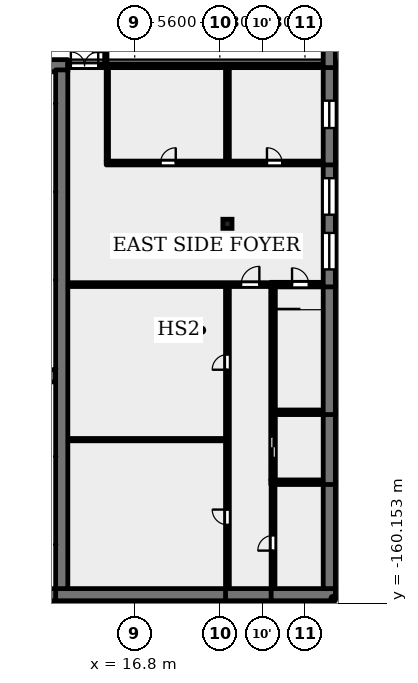
"""IFC4 building model, lengths in metres.
Left out: names, types, materials, properties, quantities, classifications, styles, units other than length and angle.
Written with IfcOpenShell. Run it as: python <this file> out.ifc"""

import sys

from ifc_helpers import new_model, si_unit, direction, frame, frame_2d, origin, origin_2d, place, context, subcontext, project, spatial, rectangle, extrude, element, fill, save


model = new_model("IFC4")
c1 = context("Model", 3, precision=1e-05, world=origin(), true_north=direction((0.0, 1.0)))
c2 = subcontext(c1, "Body", "Model", "MODEL_VIEW")
j1 = project(units=[si_unit("LENGTHUNIT", "METRE"), si_unit("PLANEANGLEUNIT", "RADIAN")], contexts=[c1])
p1 = place(None, origin())
s1 = spatial("IfcSite", under=j1, at=p1, CompositionType="ELEMENT")
p2 = place(p1, origin())
s2 = spatial("IfcBuilding", under=s1, at=p2, CompositionType="ELEMENT")
p3 = place(p2, frame((0.0, 0.0, 20.9)))
s3 = spatial("IfcBuildingStorey", under=s2, at=p3, CompositionType="ELEMENT", Elevation=20.9)
p4 = place(p3, frame((22.9, -135.2, 0.0), z_axis=(0.0, 0.0, 1.0), x_axis=(1.0, 0.0, 0.0)))
e1 = element("IfcColumn", 1, at=p4, inside=s3, PredefinedType="COLUMN", context=c2, shape_type="SweptSolid", body=[
    extrude(rectangle(XDim=0.6, YDim=0.6, at=origin_2d()), origin(), (0.0, 0.0, 1.0), 4.5),
])
p5 = place(p3, frame((-12.4, -159.6, 0.0), z_axis=(0.0, 0.0, 1.0), x_axis=(1.0, 0.0, 0.0)))
e2 = element("IfcWall", 2, at=p5, inside=s3, PredefinedType="SOLIDWALL", context=c2, shape_type="SweptSolid", body=[
    extrude(rectangle(XDim=24.8, YDim=0.8, at=frame_2d((12.4, 0.0))), origin(), (0.0, 0.0, 1.0), 5.55),
])
p6 = place(p3, frame((11.6, -159.6, 0.0), z_axis=(0.0, 0.0, 1.0), x_axis=(1.0, 0.0, 0.0)))
e3 = element("IfcWall", 3, at=p6, inside=s3, PredefinedType="SOLIDWALL", context=c2, shape_type="SweptSolid", body=[
    extrude(rectangle(XDim=11.425, YDim=0.8, at=frame_2d((5.712, 0.0))), origin(), (0.0, 0.0, 1.0), 4.5),
])
p7 = place(p3, frame((22.775, -159.6, 0.0), z_axis=(0.0, 0.0, 1.0), x_axis=(1.0, 0.0, 0.0)))
e4 = element("IfcWall", 4, at=p7, inside=s3, PredefinedType="SOLIDWALL", context=c2, shape_type="SweptSolid", body=[
    extrude(rectangle(XDim=3.25, YDim=0.8, at=frame_2d((1.625, 0.0))), origin(), (0.0, 0.0, 1.0), 4.5),
])
p8 = place(p3, frame((25.775, -159.6, 0.0), z_axis=(0.0, 0.0, 1.0), x_axis=(1.0, 0.0, 0.0)))
e5 = element("IfcWall", 5, at=p8, inside=s3, PredefinedType="SOLIDWALL", context=c2, shape_type="SweptSolid", body=[
    extrude(rectangle(XDim=4.225, YDim=0.8, at=frame_2d((2.112, 0.0))), origin(), (0.0, 0.0, 1.0), 4.5),
])
p9 = place(p3, frame((25.75, -152.2, 0.0), z_axis=(0.0, 0.0, 1.0), x_axis=(1.0, 0.0, 0.0)))
e6 = element("IfcWall", 6, at=p9, inside=s3, PredefinedType="SOLIDWALL", context=c2, shape_type="SweptSolid", body=[
    extrude(rectangle(XDim=3.45, YDim=0.3, at=frame_2d((1.725, 0.0))), origin(), (0.0, 0.0, 1.0), 4.5),
])
p10 = place(p3, frame((12.4, -149.4, 0.0), z_axis=(0.0, 0.0, 1.0), x_axis=(1.0, 0.0, 0.0)))
e7 = element("IfcWall", 7, at=p10, inside=s3, PredefinedType="PARTITIONING", context=c2, shape_type="SweptSolid", body=[
    extrude(rectangle(XDim=10.375, YDim=0.15, at=frame_2d((5.188, 0.0))), origin(), (0.0, 0.0, 1.0), 4.5),
])
p11 = place(p3, frame((26.05, -147.6, 0.0), z_axis=(0.0, 0.0, 1.0), x_axis=(1.0, 0.0, 0.0)))
e8 = element("IfcWall", 8, at=p11, inside=s3, PredefinedType="SOLIDWALL", context=c2, shape_type="SweptSolid", body=[
    extrude(rectangle(XDim=3.15, YDim=0.3, at=frame_2d((1.575, 0.0))), origin(), (0.0, 0.0, 1.0), 4.5),
])
p12 = place(p3, frame((-11.6, -145.2, 0.0), z_axis=(0.0, 0.0, 1.0), x_axis=(1.0, 0.0, 0.0)))
e9 = element("IfcWall", 9, at=p12, inside=s3, PredefinedType="SOLIDWALL", context=c2, shape_type="SweptSolid", body=[
    extrude(rectangle(XDim=23.2, YDim=0.8, at=frame_2d((11.6, 0.0))), origin(), (0.0, 0.0, 1.0), 5.55),
])
p13 = place(p3, frame((12.4, -139.2, 0.0), z_axis=(0.0, 0.0, 1.0), x_axis=(1.0, 0.0, 0.0)))
e10 = element("IfcWall", 10, at=p13, inside=s3, PredefinedType="SOLIDWALL", context=c2, shape_type="SweptSolid", body=[
    extrude(rectangle(XDim=13.35, YDim=0.25, at=frame_2d((6.675, 0.0))), origin(), (0.0, 0.0, 1.0), 4.5),
])
p14 = place(p13, frame((11.4, 0.0, 0.0)))
e11 = element("IfcOpeningElement", 11, at=p14, cuts=e10, PredefinedType="OPENING", context=c2, shape_type="SweptSolid", body=[
    extrude(rectangle(XDim=1.2, YDim=2.1, at=frame_2d((0.6, 1.05))), frame((0.0, 0.135, 0.0), z_axis=(0.0, -1.0, 0.0), x_axis=(1.0, 0.0, 0.0)), (0.0, 0.0, 1.0), 0.27),
])
p15 = place(p3, frame((25.75, -139.2, 0.0), z_axis=(0.0, 0.0, 1.0), x_axis=(1.0, 0.0, 0.0)))
e12 = element("IfcWall", 12, at=p15, inside=s3, PredefinedType="SOLIDWALL", context=c2, shape_type="SweptSolid", body=[
    extrude(rectangle(XDim=3.45, YDim=0.3, at=frame_2d((1.725, 0.0))), origin(), (0.0, 0.0, 1.0), 4.5),
])
p16 = place(p15, frame((1.4, 0.0, 0.0)))
e13 = element("IfcOpeningElement", 13, at=p16, cuts=e12, PredefinedType="OPENING", context=c2, shape_type="SweptSolid", body=[
    extrude(rectangle(XDim=1.1, YDim=2.1, at=frame_2d((0.55, 1.05))), frame((0.0, 0.16, 0.0), z_axis=(0.0, -1.0, 0.0), x_axis=(1.0, 0.0, 0.0)), (0.0, 0.0, 1.0), 0.32),
])
p17 = place(p3, frame((14.925, -131.2, 0.0), z_axis=(0.0, 0.0, 1.0), x_axis=(1.0, 0.0, 0.0)))
e14 = element("IfcWall", 14, at=p17, inside=s3, PredefinedType="SOLIDWALL", context=c2, shape_type="SweptSolid", body=[
    extrude(rectangle(XDim=14.275, YDim=0.25, at=frame_2d((7.137, 0.0))), origin(), (0.0, 0.0, 1.0), 4.5),
])
p18 = place(p17, frame((3.575, 0.0, 0.0)))
e15 = element("IfcOpeningElement", 15, at=p18, cuts=e14, PredefinedType="OPENING", context=c2, shape_type="SweptSolid", body=[
    extrude(rectangle(XDim=1.0, YDim=2.1, at=frame_2d((0.5, 1.05))), frame((0.0, 0.135, 0.0), z_axis=(0.0, -1.0, 0.0), x_axis=(1.0, 0.0, 0.0)), (0.0, 0.0, 1.0), 0.27),
])
p19 = place(p17, frame((10.575, 0.0, 0.0)))
e16 = element("IfcOpeningElement", 16, at=p19, cuts=e14, PredefinedType="OPENING", context=c2, shape_type="SweptSolid", body=[
    extrude(rectangle(XDim=1.0, YDim=2.1, at=frame_2d((0.5, 1.05))), frame((0.0, 0.135, 0.0), z_axis=(0.0, -1.0, 0.0), x_axis=(1.0, 0.0, 0.0)), (0.0, 0.0, 1.0), 0.27),
])
p20 = place(p3, frame((-12.4, -124.8, 0.0), z_axis=(0.0, 0.0, 1.0), x_axis=(1.0, 0.0, 0.0)))
e17 = element("IfcWall", 17, at=p20, inside=s3, PredefinedType="SOLIDWALL", context=c2, shape_type="SweptSolid", body=[
    extrude(rectangle(XDim=24.8, YDim=0.8, at=frame_2d((12.4, 0.0))), origin(), (0.0, 0.0, 1.0), 5.55),
])
p21 = place(p3, frame((12.4, -124.8, 0.0), z_axis=(0.0, 0.0, 1.0), x_axis=(1.0, 0.0, 0.0)))
e18 = element("IfcWall", 18, at=p21, inside=s3, PredefinedType="SOLIDWALL", context=c2, shape_type="SweptSolid", body=[
    extrude(rectangle(XDim=16.8, YDim=0.25, at=frame_2d((8.4, 0.0))), origin(), (0.0, 0.0, 1.0), 4.5),
])
p22 = place(p21, frame((0.2, 0.0, 0.0)))
e19 = element("IfcOpeningElement", 19, at=p22, cuts=e18, PredefinedType="OPENING", context=c2, shape_type="SweptSolid", body=[
    extrude(rectangle(XDim=1.8, YDim=2.1, at=frame_2d((0.9, 1.05))), frame((0.0, 0.135, 0.0), z_axis=(0.0, -1.0, 0.0), x_axis=(1.0, 0.0, 0.0)), (0.0, 0.0, 1.0), 0.27),
])
p23 = place(p3, frame((12.0, -159.2, 0.0), z_axis=(0.0, 0.0, 1.0), x_axis=(0.0, 1.0, 0.0)))
e20 = element("IfcWall", 20, at=p23, inside=s3, PredefinedType="SOLIDWALL", context=c2, shape_type="SweptSolid", body=[
    extrude(rectangle(XDim=34.125, YDim=0.8, at=frame_2d((17.062, 0.0))), origin(), (0.0, 0.0, 1.0), 5.55),
])
p24 = place(p3, frame((14.9, -124.675, 0.0), z_axis=(0.0, 0.0, 1.0), x_axis=(0.0, 1.0, 0.0)))
e21 = element("IfcWall", 21, at=p24, inside=s3, PredefinedType="PARTITIONING", context=c2, shape_type="SweptSolid", body=[
    extrude(rectangle(XDim=3.325, YDim=0.15, at=frame_2d((1.663, 0.0))), origin(), (0.0, 0.0, 1.0), 4.5),
])
p25 = place(p24, frame((0.775, 0.0, 0.0)))
e22 = element("IfcOpeningElement", 22, at=p25, cuts=e21, PredefinedType="OPENING", context=c2, shape_type="SweptSolid", body=[
    extrude(rectangle(XDim=1.8, YDim=2.1, at=frame_2d((0.9, 1.05))), frame((0.0, 0.085, 0.0), z_axis=(0.0, -1.0, 0.0), x_axis=(1.0, 0.0, 0.0)), (0.0, 0.0, 1.0), 0.17),
])
p26 = place(p3, frame((15.0, -131.075, 0.0), z_axis=(0.0, 0.0, 1.0), x_axis=(0.0, 1.0, 0.0)))
e23 = element("IfcWall", 23, at=p26, inside=s3, PredefinedType="PARTITIONING", context=c2, shape_type="SweptSolid", body=[
    extrude(rectangle(XDim=6.15, YDim=0.15, at=frame_2d((3.075, 0.0))), origin(), (0.0, 0.0, 1.0), 4.5),
])
p27 = place(p3, frame((22.9, -159.2, 0.0), z_axis=(0.0, 0.0, 1.0), x_axis=(0.0, 1.0, 0.0)))
e24 = element("IfcWall", 24, at=p27, inside=s3, PredefinedType="SOLIDWALL", context=c2, shape_type="SweptSolid", body=[
    extrude(rectangle(XDim=19.875, YDim=0.25, at=frame_2d((9.938, 0.0))), origin(), (0.0, 0.0, 1.0), 4.5),
])
p28 = place(p27, frame((14.4, 0.0, 0.0)))
e25 = element("IfcOpeningElement", 25, at=p28, cuts=e24, PredefinedType="OPENING", context=c2, shape_type="SweptSolid", body=[
    extrude(rectangle(XDim=1.0, YDim=2.1, at=frame_2d((0.5, 1.05))), frame((0.0, 0.135, 0.0), z_axis=(0.0, -1.0, 0.0), x_axis=(1.0, 0.0, 0.0)), (0.0, 0.0, 1.0), 0.27),
])
p29 = place(p27, frame((4.2, 0.0, 0.0)))
e26 = element("IfcOpeningElement", 26, at=p29, cuts=e24, PredefinedType="OPENING", context=c2, shape_type="SweptSolid", body=[
    extrude(rectangle(XDim=1.0, YDim=2.1, at=frame_2d((0.5, 1.05))), frame((0.0, 0.135, 0.0), z_axis=(0.0, -1.0, 0.0), x_axis=(1.0, 0.0, 0.0)), (0.0, 0.0, 1.0), 0.27),
])
p30 = place(p3, frame((22.9, -131.075, 0.0), z_axis=(0.0, 0.0, 1.0), x_axis=(0.0, 1.0, 0.0)))
e27 = element("IfcWall", 27, at=p30, inside=s3, PredefinedType="SOLIDWALL", context=c2, shape_type="SweptSolid", body=[
    extrude(rectangle(XDim=6.15, YDim=0.25, at=frame_2d((3.075, 0.0))), origin(), (0.0, 0.0, 1.0), 4.5),
])
p31 = place(p3, frame((25.9, -159.2, 0.0), z_axis=(0.0, 0.0, 1.0), x_axis=(0.0, 1.0, 0.0)))
e28 = element("IfcWall", 28, at=p31, inside=s3, PredefinedType="SOLIDWALL", context=c2, shape_type="SweptSolid", body=[
    extrude(rectangle(XDim=6.85, YDim=0.25, at=frame_2d((3.425, 0.0))), origin(), (0.0, 0.0, 1.0), 4.5),
])
p32 = place(p31, frame((2.5, 0.0, 0.0)))
e29 = element("IfcOpeningElement", 29, at=p32, cuts=e28, PredefinedType="OPENING", context=c2, shape_type="SweptSolid", body=[
    extrude(rectangle(XDim=1.0, YDim=2.1, at=frame_2d((0.5, 1.05))), frame((0.0, 0.135, 0.0), z_axis=(0.0, -1.0, 0.0), x_axis=(1.0, 0.0, 0.0)), (0.0, 0.0, 1.0), 0.27),
])
p33 = place(p3, frame((25.9, -152.05, 0.0), z_axis=(0.0, 0.0, 1.0), x_axis=(0.0, 1.0, 0.0)))
e30 = element("IfcWall", 30, at=p33, inside=s3, PredefinedType="SOLIDWALL", context=c2, shape_type="SweptSolid", body=[
    extrude(rectangle(XDim=12.825, YDim=0.3, at=frame_2d((6.413, 0.0))), origin(), (0.0, 0.0, 1.0), 4.5),
])
p34 = place(p33, frame((1.45, 0.0, 0.0)))
e31 = element("IfcOpeningElement", 31, at=p34, cuts=e30, PredefinedType="OPENING", context=c2, shape_type="SweptSolid", body=[
    extrude(rectangle(XDim=1.4, YDim=2.2, at=frame_2d((0.7, 1.1))), frame((0.0, 0.16, 0.0), z_axis=(0.0, -1.0, 0.0), x_axis=(1.0, 0.0, 0.0)), (0.0, 0.0, 1.0), 0.32),
])
p35 = place(p3, frame((29.6, -152.05, 0.0), z_axis=(0.0, 0.0, 1.0), x_axis=(0.0, -1.0, 0.0)))
e32 = element("IfcWall", 32, at=p35, inside=s3, PredefinedType="SOLIDWALL", context=c2, shape_type="SweptSolid", body=[
    extrude(rectangle(XDim=7.15, YDim=0.8, at=frame_2d((3.575, 0.0))), origin(), (0.0, 0.0, 1.0), 4.5),
])
p36 = place(p3, frame((29.6, -147.45, 0.0), z_axis=(0.0, 0.0, 1.0), x_axis=(0.0, -1.0, 0.0)))
e33 = element("IfcWall", 33, at=p36, inside=s3, PredefinedType="SOLIDWALL", context=c2, shape_type="SweptSolid", body=[
    extrude(rectangle(XDim=4.9, YDim=0.8, at=frame_2d((2.45, 0.0))), origin(), (0.0, 0.0, 1.0), 4.5),
])
p37 = place(p3, frame((29.6, -139.05, 0.0), z_axis=(0.0, 0.0, 1.0), x_axis=(0.0, -1.0, 0.0)))
e34 = element("IfcWall", 34, at=p37, inside=s3, PredefinedType="SOLIDWALL", context=c2, shape_type="SweptSolid", body=[
    extrude(rectangle(XDim=8.7, YDim=0.8, at=frame_2d((4.35, 0.0))), origin(), (0.0, 0.0, 1.0), 4.5),
])
p38 = place(p3, frame((29.6, -131.075, 0.0), z_axis=(0.0, 0.0, 1.0), x_axis=(0.0, -1.0, 0.0)))
e35 = element("IfcWall", 35, at=p38, inside=s3, PredefinedType="SOLIDWALL", context=c2, shape_type="SweptSolid", body=[
    extrude(rectangle(XDim=8.275, YDim=0.8, at=frame_2d((4.137, 0.0))), origin(), (0.0, 0.0, 1.0), 4.5),
])
p39 = place(p38, frame((4.725, 0.0, 0.6)))
e36 = element("IfcOpeningElement", 36, at=p39, cuts=e35, PredefinedType="OPENING", context=c2, shape_type="SweptSolid", body=[
    extrude(rectangle(XDim=2.4, YDim=3.2, at=frame_2d((1.2, 1.6))), frame((0.0, 0.41, 0.0), z_axis=(0.0, -1.0, 0.0), x_axis=(1.0, 0.0, 0.0)), (0.0, 0.0, 1.0), 0.82),
])
p40 = place(p38, frame((1.125, 0.0, 0.6)))
e37 = element("IfcOpeningElement", 37, at=p40, cuts=e35, PredefinedType="OPENING", context=c2, shape_type="SweptSolid", body=[
    extrude(rectangle(XDim=2.4, YDim=3.2, at=frame_2d((1.2, 1.6))), frame((0.0, 0.41, 0.0), z_axis=(0.0, -1.0, 0.0), x_axis=(1.0, 0.0, 0.0)), (0.0, 0.0, 1.0), 0.82),
])
p41 = place(p3, frame((29.6, -124.675, 0.0), z_axis=(0.0, 0.0, 1.0), x_axis=(0.0, -1.0, 0.0)))
e38 = element("IfcWall", 38, at=p41, inside=s3, PredefinedType="SOLIDWALL", context=c2, shape_type="SweptSolid", body=[
    extrude(rectangle(XDim=6.65, YDim=0.8, at=frame_2d((3.325, 0.0))), origin(), (0.0, 0.0, 1.0), 4.5),
])
p42 = place(p41, frame((2.425, 0.0, 0.9)))
e39 = element("IfcOpeningElement", 39, at=p42, cuts=e38, PredefinedType="OPENING", context=c2, shape_type="SweptSolid", body=[
    extrude(rectangle(XDim=1.8, YDim=1.5, at=frame_2d((0.9, 0.75))), frame((0.0, 0.41, 0.0), z_axis=(0.0, -1.0, 0.0), x_axis=(1.0, 0.0, 0.0)), (0.0, 0.0, 1.0), 0.82),
])
p43 = place(p3, frame((29.6, -121.05, 0.0), z_axis=(0.0, 0.0, 1.0), x_axis=(0.0, -1.0, 0.0)))
e40 = element("IfcWall", 40, at=p43, inside=s3, PredefinedType="SOLIDWALL", context=c2, shape_type="SweptSolid", body=[
    extrude(rectangle(XDim=3.875, YDim=0.8, at=frame_2d((1.938, 0.0))), origin(), (0.0, 0.0, 1.0), 4.5),
])
p44 = place(p3, frame((29.85, -159.85, 4.8), z_axis=(0.0, 0.0, 1.0), x_axis=(0.0, 1.0, 0.0)))
e41 = element("IfcWall", 41, at=p44, inside=s3, PredefinedType="PARAPET", context=c2, shape_type="SweptSolid", body=[
    extrude(rectangle(XDim=35.45, YDim=0.3, at=frame_2d((17.725, 0.0))), origin(), (0.0, 0.0, 1.0), 1.0),
])
p45 = place(p3, frame((12.4, -159.85, 4.8), z_axis=(0.0, 0.0, 1.0), x_axis=(1.0, 0.0, 0.0)))
e42 = element("IfcWall", 42, at=p45, inside=s3, PredefinedType="PARAPET", context=c2, shape_type="SweptSolid", body=[
    extrude(rectangle(XDim=17.3, YDim=0.3, at=frame_2d((8.65, 0.0))), origin(), (0.0, 0.0, 1.0), 1.0),
])
p46 = place(p39, origin())
e43 = element("IfcWindow", 43, at=p46, inside=s3, PartitioningType="SINGLE_PANEL", PredefinedType="WINDOW", context=c2, shape_type="SweptSolid", body=[
    extrude(rectangle(XDim=2.4, YDim=3.2, at=frame_2d((1.2, 1.6))), frame((0.0, 0.03, 0.0), z_axis=(0.0, -1.0, 0.0), x_axis=(1.0, 0.0, 0.0)), (0.0, 0.0, 1.0), 0.06),
])
fill(e36, e43)
p47 = place(p40, origin())
e44 = element("IfcWindow", 44, at=p47, inside=s3, PartitioningType="SINGLE_PANEL", PredefinedType="WINDOW", context=c2, shape_type="SweptSolid", body=[
    extrude(rectangle(XDim=2.4, YDim=3.2, at=frame_2d((1.2, 1.6))), frame((0.0, 0.03, 0.0), z_axis=(0.0, -1.0, 0.0), x_axis=(1.0, 0.0, 0.0)), (0.0, 0.0, 1.0), 0.06),
])
fill(e37, e44)
p48 = place(p42, origin())
e45 = element("IfcWindow", 45, at=p48, inside=s3, PartitioningType="SINGLE_PANEL", PredefinedType="WINDOW", context=c2, shape_type="SweptSolid", body=[
    extrude(rectangle(XDim=1.8, YDim=1.5, at=frame_2d((0.9, 0.75))), frame((0.0, 0.03, 0.0), z_axis=(0.0, -1.0, 0.0), x_axis=(1.0, 0.0, 0.0)), (0.0, 0.0, 1.0), 0.06),
])
fill(e39, e45)
p49 = place(p34, origin())
e46 = element("IfcDoor", 46, at=p49, inside=s3, OperationType="DOUBLE_DOOR_SLIDING", PredefinedType="DOOR", context=c2, shape_type="SweptSolid", body=[
    extrude(rectangle(XDim=1.4, YDim=2.2, at=frame_2d((0.7, 1.1))), frame((0.0, 0.025, 0.0), z_axis=(0.0, -1.0, 0.0), x_axis=(1.0, 0.0, 0.0)), (0.0, 0.0, 1.0), 0.05),
])
fill(e31, e46)
p50 = place(p16, origin())
e47 = element("IfcDoor", 47, at=p50, inside=s3, OperationType="SINGLE_SWING_LEFT", PredefinedType="DOOR", context=c2, shape_type="SweptSolid", body=[
    extrude(rectangle(XDim=1.1, YDim=2.1, at=frame_2d((0.55, 1.05))), frame((0.0, 0.025, 0.0), z_axis=(0.0, -1.0, 0.0), x_axis=(1.0, 0.0, 0.0)), (0.0, 0.0, 1.0), 0.05),
])
fill(e13, e47)
p51 = place(p22, origin())
e48 = element("IfcDoor", 48, at=p51, inside=s3, OperationType="DOUBLE_DOOR_SINGLE_SWING", PredefinedType="DOOR", context=c2, shape_type="SweptSolid", body=[
    extrude(rectangle(XDim=1.8, YDim=2.1, at=frame_2d((0.9, 1.05))), frame((0.0, 0.025, 0.0), z_axis=(0.0, -1.0, 0.0), x_axis=(1.0, 0.0, 0.0)), (0.0, 0.0, 1.0), 0.05),
])
fill(e19, e48)
p52 = place(p14, origin())
e49 = element("IfcDoor", 49, at=p52, inside=s3, OperationType="SINGLE_SWING_RIGHT", PredefinedType="DOOR", context=c2, shape_type="SweptSolid", body=[
    extrude(rectangle(XDim=1.2, YDim=2.1, at=frame_2d((0.6, 1.05))), frame((0.0, 0.025, 0.0), z_axis=(0.0, -1.0, 0.0), x_axis=(1.0, 0.0, 0.0)), (0.0, 0.0, 1.0), 0.05),
])
fill(e11, e49)
p53 = place(p28, origin())
e50 = element("IfcDoor", 50, at=p53, inside=s3, OperationType="SINGLE_SWING_LEFT", PredefinedType="DOOR", context=c2, shape_type="SweptSolid", body=[
    extrude(rectangle(XDim=1.0, YDim=2.1, at=frame_2d((0.5, 1.05))), frame((0.0, 0.025, 0.0), z_axis=(0.0, -1.0, 0.0), x_axis=(1.0, 0.0, 0.0)), (0.0, 0.0, 1.0), 0.05),
])
fill(e25, e50)
p54 = place(p29, origin())
e51 = element("IfcDoor", 51, at=p54, inside=s3, OperationType="SINGLE_SWING_RIGHT", PredefinedType="DOOR", context=c2, shape_type="SweptSolid", body=[
    extrude(rectangle(XDim=1.0, YDim=2.1, at=frame_2d((0.5, 1.05))), frame((0.0, 0.025, 0.0), z_axis=(0.0, -1.0, 0.0), x_axis=(1.0, 0.0, 0.0)), (0.0, 0.0, 1.0), 0.05),
])
fill(e26, e51)
p55 = place(p32, origin())
e52 = element("IfcDoor", 52, at=p55, inside=s3, OperationType="SINGLE_SWING_LEFT", PredefinedType="DOOR", context=c2, shape_type="SweptSolid", body=[
    extrude(rectangle(XDim=1.0, YDim=2.1, at=frame_2d((0.5, 1.05))), frame((0.0, 0.025, 0.0), z_axis=(0.0, -1.0, 0.0), x_axis=(1.0, 0.0, 0.0)), (0.0, 0.0, 1.0), 0.05),
])
fill(e29, e52)
p56 = place(p18, origin())
e53 = element("IfcDoor", 53, at=p56, inside=s3, OperationType="SINGLE_SWING_RIGHT", PredefinedType="DOOR", context=c2, shape_type="SweptSolid", body=[
    extrude(rectangle(XDim=1.0, YDim=2.1, at=frame_2d((0.5, 1.05))), frame((0.0, 0.025, 0.0), z_axis=(0.0, -1.0, 0.0), x_axis=(1.0, 0.0, 0.0)), (0.0, 0.0, 1.0), 0.05),
])
fill(e15, e53)
p57 = place(p19, origin())
e54 = element("IfcDoor", 54, at=p57, inside=s3, OperationType="SINGLE_SWING_LEFT", PredefinedType="DOOR", context=c2, shape_type="SweptSolid", body=[
    extrude(rectangle(XDim=1.0, YDim=2.1, at=frame_2d((0.5, 1.05))), frame((0.0, 0.025, 0.0), z_axis=(0.0, -1.0, 0.0), x_axis=(1.0, 0.0, 0.0)), (0.0, 0.0, 1.0), 0.05),
])
fill(e16, e54)
save(model, sys.argv[1])
